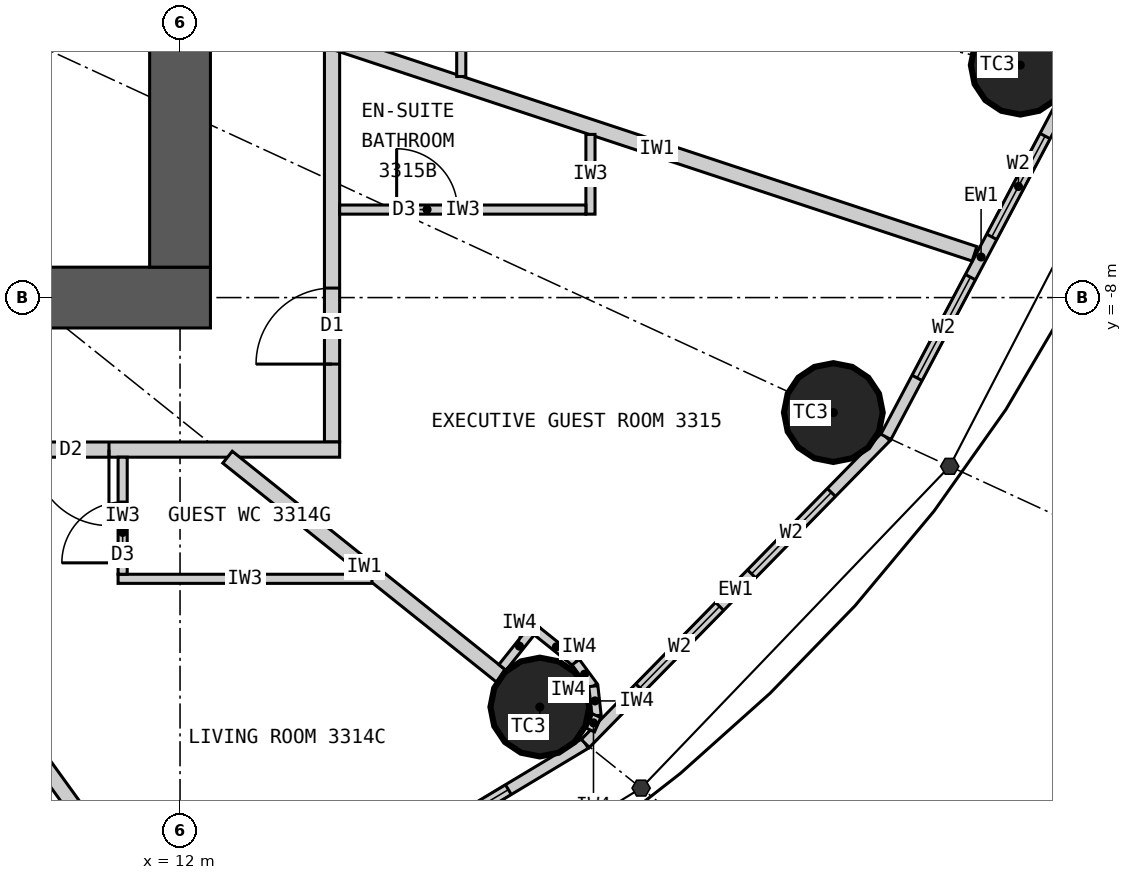
"""IFC4 building model, lengths in metres.
Left out: names, types, materials, properties, quantities, classifications, styles, units other than length and angle.
Written with IfcOpenShell. Run it as: python <this file> out.ifc"""

import sys

from ifc_helpers import new_model, si_unit, direction, frame, frame_2d, origin, origin_2d, place, context, subcontext, project, spatial, rectangle, circle, extrude, element, fill, save


model = new_model("IFC4")
c1 = context("Model", 3, precision=1e-05, world=origin(), true_north=direction((0.0, 1.0)))
c2 = subcontext(c1, "Body", "Model", "MODEL_VIEW")
j1 = project(units=[si_unit("LENGTHUNIT", "METRE"), si_unit("PLANEANGLEUNIT", "RADIAN")], contexts=[c1])
p1 = place(None, origin())
s1 = spatial("IfcSite", under=j1, at=p1, CompositionType="ELEMENT")
p2 = place(p1, origin())
s2 = spatial("IfcBuilding", under=s1, at=p2, CompositionType="ELEMENT")
p3 = place(p2, frame((0.0, 0.0, 128.7)))
s3 = spatial("IfcBuildingStorey", under=s2, at=p3, CompositionType="ELEMENT", Elevation=128.7)
for number, where, z_axis, x_axis in (
    (1, (16.734, -13.387, 0.0), (0.0, 0.0, 1.0), (1.0, 0.0, 0.0)),
    (2, (20.596, -9.513, 0.0), (0.0, 0.0, 1.0), (1.0, 0.0, 0.0)),
    (3, (23.055, -4.942, 0.0), (0.0, 0.0, 1.0), (1.0, 0.0, 0.0)),
):
    element("IfcColumn", number, at=place(p3, frame(where, z_axis=z_axis, x_axis=x_axis)), inside=s3, PredefinedType="COLUMN", context=c2, shape_type="SweptSolid", body=[
        extrude(circle(Radius=0.65, at=origin_2d()), origin(), (0.0, 0.0, 1.0), 3.3),
    ])
p4 = place(p3, frame((12.4, -8.0, 0.0), z_axis=(0.0, 0.0, 1.0), x_axis=(-1.0, 0.0, 0.0)))
e4 = element("IfcWall", 4, at=p4, inside=s3, PredefinedType="SHEAR", context=c2, shape_type="SweptSolid", body=[
    extrude(rectangle(XDim=24.8, YDim=0.8, at=frame_2d((12.4, 0.0))), origin(), (0.0, 0.0, 1.0), 3.3),
])
p5 = place(p4, frame((11.1, 0.0, 0.0)))
e5 = element("IfcOpeningElement", 5, at=p5, cuts=e4, PredefinedType="OPENING", context=c2, shape_type="SweptSolid", body=[
    extrude(rectangle(XDim=1.2, YDim=2.2, at=frame_2d((0.6, 1.1))), frame((0.0, 0.41, 0.0), z_axis=(0.0, -1.0, 0.0), x_axis=(1.0, 0.0, 0.0)), (0.0, 0.0, 1.0), 0.82),
])
p6 = place(p4, frame((18.7, 0.0, 0.0)))
e6 = element("IfcOpeningElement", 6, at=p6, cuts=e4, PredefinedType="OPENING", context=c2, shape_type="SweptSolid", body=[
    extrude(rectangle(XDim=0.9, YDim=2.2, at=frame_2d((0.45, 1.1))), frame((0.0, 0.41, 0.0), z_axis=(0.0, -1.0, 0.0), x_axis=(1.0, 0.0, 0.0)), (0.0, 0.0, 1.0), 0.82),
])
p7 = place(p3, frame((12.0, -7.6, 0.0), z_axis=(0.0, 0.0, 1.0), x_axis=(0.0, 1.0, 0.0)))
e7 = element("IfcWall", 7, at=p7, inside=s3, PredefinedType="SHEAR", context=c2, shape_type="SweptSolid", body=[
    extrude(rectangle(XDim=15.2, YDim=0.8, at=frame_2d((7.6, 0.0))), origin(), (0.0, 0.0, 1.0), 3.3),
])
p8 = place(p7, frame((6.7, 0.0, 0.0)))
e8 = element("IfcOpeningElement", 8, at=p8, cuts=e7, PredefinedType="OPENING", context=c2, shape_type="SweptSolid", body=[
    extrude(rectangle(XDim=1.8, YDim=2.2, at=frame_2d((0.9, 1.1))), frame((0.0, 0.41, 0.0), z_axis=(0.0, -1.0, 0.0), x_axis=(1.0, 0.0, 0.0)), (0.0, 0.0, 1.0), 0.82),
])
p9 = place(p3, frame((12.221, -16.935, 0.0), z_axis=(0.0, 0.0, 1.0), x_axis=(0.857308573723, 0.514802884044, 0.0)))
e9 = element("IfcWall", 9, at=p9, inside=s3, PredefinedType="ELEMENTEDWALL", context=c2, shape_type="SweptSolid", body=[
    extrude(rectangle(XDim=5.961, YDim=0.15, at=frame_2d((2.98, 0.0))), origin(), (0.0, 0.0, 1.0), 3.12),
])
p10 = place(p9, frame((1.181, 0.0, 0.9)))
e10 = element("IfcOpeningElement", 10, at=p10, cuts=e9, PredefinedType="OPENING", context=c2, shape_type="SweptSolid", body=[
    extrude(rectangle(XDim=1.5, YDim=1.9, at=frame_2d((0.75, 0.95))), frame((0.0, 0.085, 0.0), z_axis=(0.0, -1.0, 0.0), x_axis=(1.0, 0.0, 0.0)), (0.0, 0.0, 1.0), 0.17),
])
p11 = place(p9, frame((3.281, 0.0, 0.9)))
e11 = element("IfcOpeningElement", 11, at=p11, cuts=e9, PredefinedType="OPENING", context=c2, shape_type="SweptSolid", body=[
    extrude(rectangle(XDim=1.5, YDim=1.9, at=frame_2d((0.75, 0.95))), frame((0.0, 0.085, 0.0), z_axis=(0.0, -1.0, 0.0), x_axis=(1.0, 0.0, 0.0)), (0.0, 0.0, 1.0), 0.17),
])
p12 = place(p3, frame((17.332, -13.866, 0.0), z_axis=(0.0, 0.0, 1.0), x_axis=(0.700136650834, 0.714008872605, 0.0)))
e12 = element("IfcWall", 12, at=p12, inside=s3, PredefinedType="ELEMENTEDWALL", context=c2, shape_type="SweptSolid", body=[
    extrude(rectangle(XDim=5.649, YDim=0.15, at=frame_2d((2.825, 0.0))), origin(), (0.0, 0.0, 1.0), 3.12),
])
p13 = place(p12, frame((1.025, 0.0, 0.9)))
e13 = element("IfcOpeningElement", 13, at=p13, cuts=e12, PredefinedType="OPENING", context=c2, shape_type="SweptSolid", body=[
    extrude(rectangle(XDim=1.5, YDim=1.9, at=frame_2d((0.75, 0.95))), frame((0.0, 0.085, 0.0), z_axis=(0.0, -1.0, 0.0), x_axis=(1.0, 0.0, 0.0)), (0.0, 0.0, 1.0), 0.17),
])
p14 = place(p12, frame((3.125, 0.0, 0.9)))
e14 = element("IfcOpeningElement", 14, at=p14, cuts=e12, PredefinedType="OPENING", context=c2, shape_type="SweptSolid", body=[
    extrude(rectangle(XDim=1.5, YDim=1.9, at=frame_2d((0.75, 0.95))), frame((0.0, 0.085, 0.0), z_axis=(0.0, -1.0, 0.0), x_axis=(1.0, 0.0, 0.0)), (0.0, 0.0, 1.0), 0.17),
])
p15 = place(p3, frame((21.287, -9.832, 0.0), z_axis=(0.0, 0.0, 1.0), x_axis=(0.467814388454, 0.883826735257, 0.0)))
e15 = element("IfcWall", 15, at=p15, inside=s3, PredefinedType="ELEMENTEDWALL", context=c2, shape_type="SweptSolid", body=[
    extrude(rectangle(XDim=5.354, YDim=0.15, at=frame_2d((2.677, 0.0))), origin(), (0.0, 0.0, 1.0), 3.12),
])
p16 = place(p15, frame((0.877, 0.0, 0.9)))
e16 = element("IfcOpeningElement", 16, at=p16, cuts=e15, PredefinedType="OPENING", context=c2, shape_type="SweptSolid", body=[
    extrude(rectangle(XDim=1.5, YDim=1.9, at=frame_2d((0.75, 0.95))), frame((0.0, 0.085, 0.0), z_axis=(0.0, -1.0, 0.0), x_axis=(1.0, 0.0, 0.0)), (0.0, 0.0, 1.0), 0.17),
])
p17 = place(p15, frame((2.977, 0.0, 0.9)))
e17 = element("IfcOpeningElement", 17, at=p17, cuts=e15, PredefinedType="OPENING", context=c2, shape_type="SweptSolid", body=[
    extrude(rectangle(XDim=1.5, YDim=1.9, at=frame_2d((0.75, 0.95))), frame((0.0, 0.085, 0.0), z_axis=(0.0, -1.0, 0.0), x_axis=(1.0, 0.0, 0.0)), (0.0, 0.0, 1.0), 0.17),
])
p18 = place(p3, frame((14.0, -9.9, 0.0), z_axis=(0.0, 0.0, 1.0), x_axis=(0.0, 1.0, 0.0)))
e18 = element("IfcWall", 18, at=p18, inside=s3, PredefinedType="PARTITIONING", context=c2, shape_type="SweptSolid", body=[
    extrude(rectangle(XDim=19.8, YDim=0.2, at=frame_2d((9.9, 0.0))), origin(), (0.0, 0.0, 1.0), 3.12),
])
p19 = place(p18, frame((1.025, 0.0, 0.0)))
e19 = element("IfcOpeningElement", 19, at=p19, cuts=e18, PredefinedType="OPENING", context=c2, shape_type="SweptSolid", body=[
    extrude(rectangle(XDim=1.0, YDim=2.2, at=frame_2d((0.5, 1.1))), frame((0.0, 0.11, 0.0), z_axis=(0.0, -1.0, 0.0), x_axis=(1.0, 0.0, 0.0)), (0.0, 0.0, 1.0), 0.22),
])
p20 = place(p18, frame((6.798, 0.0, 0.0)))
e20 = element("IfcOpeningElement", 20, at=p20, cuts=e18, PredefinedType="OPENING", context=c2, shape_type="SweptSolid", body=[
    extrude(rectangle(XDim=1.0, YDim=2.2, at=frame_2d((0.5, 1.1))), frame((0.0, 0.11, 0.0), z_axis=(0.0, -1.0, 0.0), x_axis=(1.0, 0.0, 0.0)), (0.0, 0.0, 1.0), 0.22),
])
p21 = place(p18, frame((13.242, 0.0, 0.0)))
e21 = element("IfcOpeningElement", 21, at=p21, cuts=e18, PredefinedType="OPENING", context=c2, shape_type="SweptSolid", body=[
    extrude(rectangle(XDim=1.0, YDim=2.2, at=frame_2d((0.5, 1.1))), frame((0.0, 0.11, 0.0), z_axis=(0.0, -1.0, 0.0), x_axis=(1.0, 0.0, 0.0)), (0.0, 0.0, 1.0), 0.22),
])
p22 = place(p18, frame((17.777, 0.0, 0.0)))
e22 = element("IfcOpeningElement", 22, at=p22, cuts=e18, PredefinedType="OPENING", context=c2, shape_type="SweptSolid", body=[
    extrude(rectangle(XDim=1.0, YDim=2.2, at=frame_2d((0.5, 1.1))), frame((0.0, 0.11, 0.0), z_axis=(0.0, -1.0, 0.0), x_axis=(1.0, 0.0, 0.0)), (0.0, 0.0, 1.0), 0.22),
])
p23 = place(p3, frame((14.1, -10.0, 0.0), z_axis=(0.0, 0.0, 1.0), x_axis=(-1.0, 0.0, 0.0)))
e23 = element("IfcWall", 23, at=p23, inside=s3, PredefinedType="PARTITIONING", context=c2, shape_type="SweptSolid", body=[
    extrude(rectangle(XDim=10.817, YDim=0.2, at=frame_2d((5.409, 0.0))), origin(), (0.0, 0.0, 1.0), 3.12),
])
p24 = place(p23, frame((3.035, 0.0, 0.0)))
e24 = element("IfcOpeningElement", 24, at=p24, cuts=e23, PredefinedType="OPENING", context=c2, shape_type="SweptSolid", body=[
    extrude(rectangle(XDim=1.0, YDim=2.2, at=frame_2d((0.5, 1.1))), frame((0.0, 0.11, 0.0), z_axis=(0.0, -1.0, 0.0), x_axis=(1.0, 0.0, 0.0)), (0.0, 0.0, 1.0), 0.22),
])
p25 = place(p3, frame((7.289, -10.1, 0.0), z_axis=(0.0, 0.0, 1.0), x_axis=(0.585217367024, -0.81087645997, 0.0)))
e25 = element("IfcWall", 25, at=p25, inside=s3, PredefinedType="PARTITIONING", context=c2, shape_type="SweptSolid", body=[
    extrude(rectangle(XDim=7.016, YDim=0.2, at=frame_2d((3.508, 0.0))), origin(), (0.0, 0.0, 1.0), 2.37),
])
p26 = place(p25, frame((0.72, 0.0, 0.0)))
e26 = element("IfcOpeningElement", 26, at=p26, cuts=e25, PredefinedType="OPENING", context=c2, shape_type="SweptSolid", body=[
    extrude(rectangle(XDim=0.9, YDim=2.1, at=frame_2d((0.45, 1.05))), frame((0.0, 0.11, 0.0), z_axis=(0.0, -1.0, 0.0), x_axis=(1.0, 0.0, 0.0)), (0.0, 0.0, 1.0), 0.22),
])
p27 = place(p3, frame((12.625, -10.1, 0.0), z_axis=(0.0, 0.0, 1.0), x_axis=(0.780863644897, -0.624701503182, 0.0)))
e27 = element("IfcWall", 27, at=p27, inside=s3, PredefinedType="PARTITIONING", context=c2, shape_type="SweptSolid", body=[
    extrude(rectangle(XDim=4.612, YDim=0.2, at=frame_2d((2.306, 0.0))), origin(), (0.0, 0.0, 1.0), 2.37),
])
p28 = place(p3, frame((14.1, -4.662, 0.0), z_axis=(0.0, 0.0, 1.0), x_axis=(0.949446466373, -0.313928984789, 0.0)))
e28 = element("IfcWall", 28, at=p28, inside=s3, PredefinedType="PARTITIONING", context=c2, shape_type="SweptSolid", body=[
    extrude(rectangle(XDim=8.797, YDim=0.2, at=frame_2d((4.399, 0.0))), origin(), (0.0, 0.0, 1.0), 3.12),
])
p29 = place(p3, frame((14.525, -11.7, 0.0), z_axis=(0.0, 0.0, 1.0), x_axis=(-1.0, 0.0, 0.0)))
e29 = element("IfcWall", 29, at=p29, inside=s3, PredefinedType="PARTITIONING", context=c2, shape_type="SweptSolid", body=[
    extrude(rectangle(XDim=3.34, YDim=0.12, at=frame_2d((1.67, 0.0))), origin(), (0.0, 0.0, 1.0), 3.12),
])
p30 = place(p3, frame((11.245, -10.1, 0.0), z_axis=(0.0, 0.0, 1.0), x_axis=(0.0, -1.0, 0.0)))
e30 = element("IfcWall", 30, at=p30, inside=s3, PredefinedType="PARTITIONING", context=c2, shape_type="SweptSolid", body=[
    extrude(rectangle(XDim=1.54, YDim=0.12, at=frame_2d((0.77, 0.0))), origin(), (0.0, 0.0, 1.0), 3.12),
])
p31 = place(p30, frame((0.59, 0.0, 0.0)))
e31 = element("IfcOpeningElement", 31, at=p31, cuts=e30, PredefinedType="OPENING", context=c2, shape_type="SweptSolid", body=[
    extrude(rectangle(XDim=0.8, YDim=2.1, at=frame_2d((0.4, 1.05))), frame((0.0, 0.07, 0.0), z_axis=(0.0, -1.0, 0.0), x_axis=(1.0, 0.0, 0.0)), (0.0, 0.0, 1.0), 0.14),
])
p32 = place(p3, frame((17.4, -5.854, 0.0), z_axis=(0.0, 0.0, 1.0), x_axis=(0.0, -1.0, 0.0)))
e32 = element("IfcWall", 32, at=p32, inside=s3, PredefinedType="PARTITIONING", context=c2, shape_type="SweptSolid", body=[
    extrude(rectangle(XDim=1.049, YDim=0.12, at=frame_2d((0.524, 0.0))), origin(), (0.0, 0.0, 1.0), 3.12),
])
p33 = place(p3, frame((14.1, -6.842, 0.0), z_axis=(0.0, 0.0, 1.0), x_axis=(1.0, 0.0, 0.0)))
e33 = element("IfcWall", 33, at=p33, inside=s3, PredefinedType="PARTITIONING", context=c2, shape_type="SweptSolid", body=[
    extrude(rectangle(XDim=3.24, YDim=0.12, at=frame_2d((1.62, 0.0))), origin(), (0.0, 0.0, 1.0), 3.12),
])
p34 = place(p33, frame((0.75, 0.0, 0.0)))
e34 = element("IfcOpeningElement", 34, at=p34, cuts=e33, PredefinedType="OPENING", context=c2, shape_type="SweptSolid", body=[
    extrude(rectangle(XDim=0.8, YDim=2.1, at=frame_2d((0.4, 1.05))), frame((0.0, 0.07, 0.0), z_axis=(0.0, -1.0, 0.0), x_axis=(1.0, 0.0, 0.0)), (0.0, 0.0, 1.0), 0.14),
])
p35 = place(p3, frame((15.7, -5.091, 0.0), z_axis=(0.0, 0.0, 1.0), x_axis=(0.0, 1.0, 0.0)))
e35 = element("IfcWall", 35, at=p35, inside=s3, PredefinedType="PARTITIONING", context=c2, shape_type="SweptSolid", body=[
    extrude(rectangle(XDim=1.869, YDim=0.12, at=frame_2d((0.935, 0.0))), origin(), (0.0, 0.0, 1.0), 3.12),
])
p36 = place(p3, frame((16.242, -12.865, 0.0), z_axis=(0.0, 0.0, 1.0), x_axis=(0.624861414622, 0.780735686719, 0.0)))
e36 = element("IfcWall", 36, at=p36, inside=s3, PredefinedType="PARTITIONING", context=c2, shape_type="SweptSolid", body=[
    extrude(rectangle(XDim=0.716, YDim=0.12, at=frame_2d((0.358, 0.0))), origin(), (0.0, 0.0, 1.0), 3.12),
])
p37 = place(p3, frame((16.698, -12.391, 0.0), z_axis=(0.0, 0.0, 1.0), x_axis=(0.780722240533, -0.624878214645, 0.0)))
e37 = element("IfcWall", 37, at=p37, inside=s3, PredefinedType="PARTITIONING", context=c2, shape_type="SweptSolid", body=[
    extrude(rectangle(XDim=0.65, YDim=0.12, at=frame_2d((0.325, 0.0))), origin(), (0.0, 0.0, 1.0), 3.12),
])
p38 = place(p3, frame((17.206, -12.797, 0.0), z_axis=(0.0, 0.0, 1.0), x_axis=(0.592986095904, -0.805212698648, 0.0)))
e38 = element("IfcWall", 38, at=p38, inside=s3, PredefinedType="PARTITIONING", context=c2, shape_type="SweptSolid", body=[
    extrude(rectangle(XDim=0.391, YDim=0.12, at=frame_2d((0.196, 0.0))), origin(), (0.0, 0.0, 1.0), 3.12),
])
p39 = place(p3, frame((17.438, -13.112, 0.0), z_axis=(0.0, 0.0, 1.0), x_axis=(0.109815164188, -0.993952025862, 0.0)))
e39 = element("IfcWall", 39, at=p39, inside=s3, PredefinedType="PARTITIONING", context=c2, shape_type="SweptSolid", body=[
    extrude(rectangle(XDim=0.391, YDim=0.12, at=frame_2d((0.196, 0.0))), origin(), (0.0, 0.0, 1.0), 3.12),
])
p40 = place(p3, frame((17.481, -13.501, 0.0), z_axis=(0.0, 0.0, 1.0), x_axis=(-0.401504188288, -0.915857186895, 0.0)))
e40 = element("IfcWall", 40, at=p40, inside=s3, PredefinedType="PARTITIONING", context=c2, shape_type="SweptSolid", body=[
    extrude(rectangle(XDim=0.206, YDim=0.12, at=frame_2d((0.103, 0.0))), origin(), (0.0, 0.0, 1.0), 3.12),
])
p41 = place(p11, origin())
e41 = element("IfcWindow", 41, at=p41, inside=s3, PartitioningType="SINGLE_PANEL", PredefinedType="WINDOW", context=c2, shape_type="SweptSolid", body=[
    extrude(rectangle(XDim=1.5, YDim=1.9, at=frame_2d((0.75, 0.95))), frame((0.0, 0.03, 0.0), z_axis=(0.0, -1.0, 0.0), x_axis=(1.0, 0.0, 0.0)), (0.0, 0.0, 1.0), 0.06),
])
fill(e11, e41)
p42 = place(p13, origin())
e42 = element("IfcWindow", 42, at=p42, inside=s3, PartitioningType="SINGLE_PANEL", PredefinedType="WINDOW", context=c2, shape_type="SweptSolid", body=[
    extrude(rectangle(XDim=1.5, YDim=1.9, at=frame_2d((0.75, 0.95))), frame((0.0, 0.03, 0.0), z_axis=(0.0, -1.0, 0.0), x_axis=(1.0, 0.0, 0.0)), (0.0, 0.0, 1.0), 0.06),
])
fill(e13, e42)
p43 = place(p14, origin())
e43 = element("IfcWindow", 43, at=p43, inside=s3, PartitioningType="SINGLE_PANEL", PredefinedType="WINDOW", context=c2, shape_type="SweptSolid", body=[
    extrude(rectangle(XDim=1.5, YDim=1.9, at=frame_2d((0.75, 0.95))), frame((0.0, 0.03, 0.0), z_axis=(0.0, -1.0, 0.0), x_axis=(1.0, 0.0, 0.0)), (0.0, 0.0, 1.0), 0.06),
])
fill(e14, e43)
p44 = place(p16, origin())
e44 = element("IfcWindow", 44, at=p44, inside=s3, PartitioningType="SINGLE_PANEL", PredefinedType="WINDOW", context=c2, shape_type="SweptSolid", body=[
    extrude(rectangle(XDim=1.5, YDim=1.9, at=frame_2d((0.75, 0.95))), frame((0.0, 0.03, 0.0), z_axis=(0.0, -1.0, 0.0), x_axis=(1.0, 0.0, 0.0)), (0.0, 0.0, 1.0), 0.06),
])
fill(e16, e44)
p45 = place(p17, origin())
e45 = element("IfcWindow", 45, at=p45, inside=s3, PartitioningType="SINGLE_PANEL", PredefinedType="WINDOW", context=c2, shape_type="SweptSolid", body=[
    extrude(rectangle(XDim=1.5, YDim=1.9, at=frame_2d((0.75, 0.95))), frame((0.0, 0.03, 0.0), z_axis=(0.0, -1.0, 0.0), x_axis=(1.0, 0.0, 0.0)), (0.0, 0.0, 1.0), 0.06),
])
fill(e17, e45)
p46 = place(p31, origin())
e46 = element("IfcDoor", 46, at=p46, inside=s3, OperationType="SINGLE_SWING_RIGHT", PredefinedType="DOOR", context=c2, shape_type="SweptSolid", body=[
    extrude(rectangle(XDim=0.8, YDim=2.1, at=frame_2d((0.4, 1.05))), frame((0.0, 0.025, 0.0), z_axis=(0.0, -1.0, 0.0), x_axis=(1.0, 0.0, 0.0)), (0.0, 0.0, 1.0), 0.05),
])
fill(e31, e46)
p47 = place(p24, origin())
e47 = element("IfcDoor", 47, at=p47, inside=s3, OperationType="SINGLE_SWING_LEFT", PredefinedType="DOOR", context=c2, shape_type="SweptSolid", body=[
    extrude(rectangle(XDim=1.0, YDim=2.2, at=frame_2d((0.5, 1.1))), frame((0.0, 0.025, 0.0), z_axis=(0.0, -1.0, 0.0), x_axis=(1.0, 0.0, 0.0)), (0.0, 0.0, 1.0), 0.05),
])
fill(e24, e47)
p48 = place(p34, origin())
e48 = element("IfcDoor", 48, at=p48, inside=s3, OperationType="SINGLE_SWING_LEFT", PredefinedType="DOOR", context=c2, shape_type="SweptSolid", body=[
    extrude(rectangle(XDim=0.8, YDim=2.1, at=frame_2d((0.4, 1.05))), frame((0.0, 0.025, 0.0), z_axis=(0.0, -1.0, 0.0), x_axis=(1.0, 0.0, 0.0)), (0.0, 0.0, 1.0), 0.05),
])
fill(e34, e48)
p49 = place(p19, origin())
e49 = element("IfcDoor", 49, at=p49, inside=s3, OperationType="SINGLE_SWING_LEFT", PredefinedType="DOOR", context=c2, shape_type="SweptSolid", body=[
    extrude(rectangle(XDim=1.0, YDim=2.2, at=frame_2d((0.5, 1.1))), frame((0.0, 0.025, 0.0), z_axis=(0.0, -1.0, 0.0), x_axis=(1.0, 0.0, 0.0)), (0.0, 0.0, 1.0), 0.05),
])
fill(e19, e49)
save(model, sys.argv[1])
